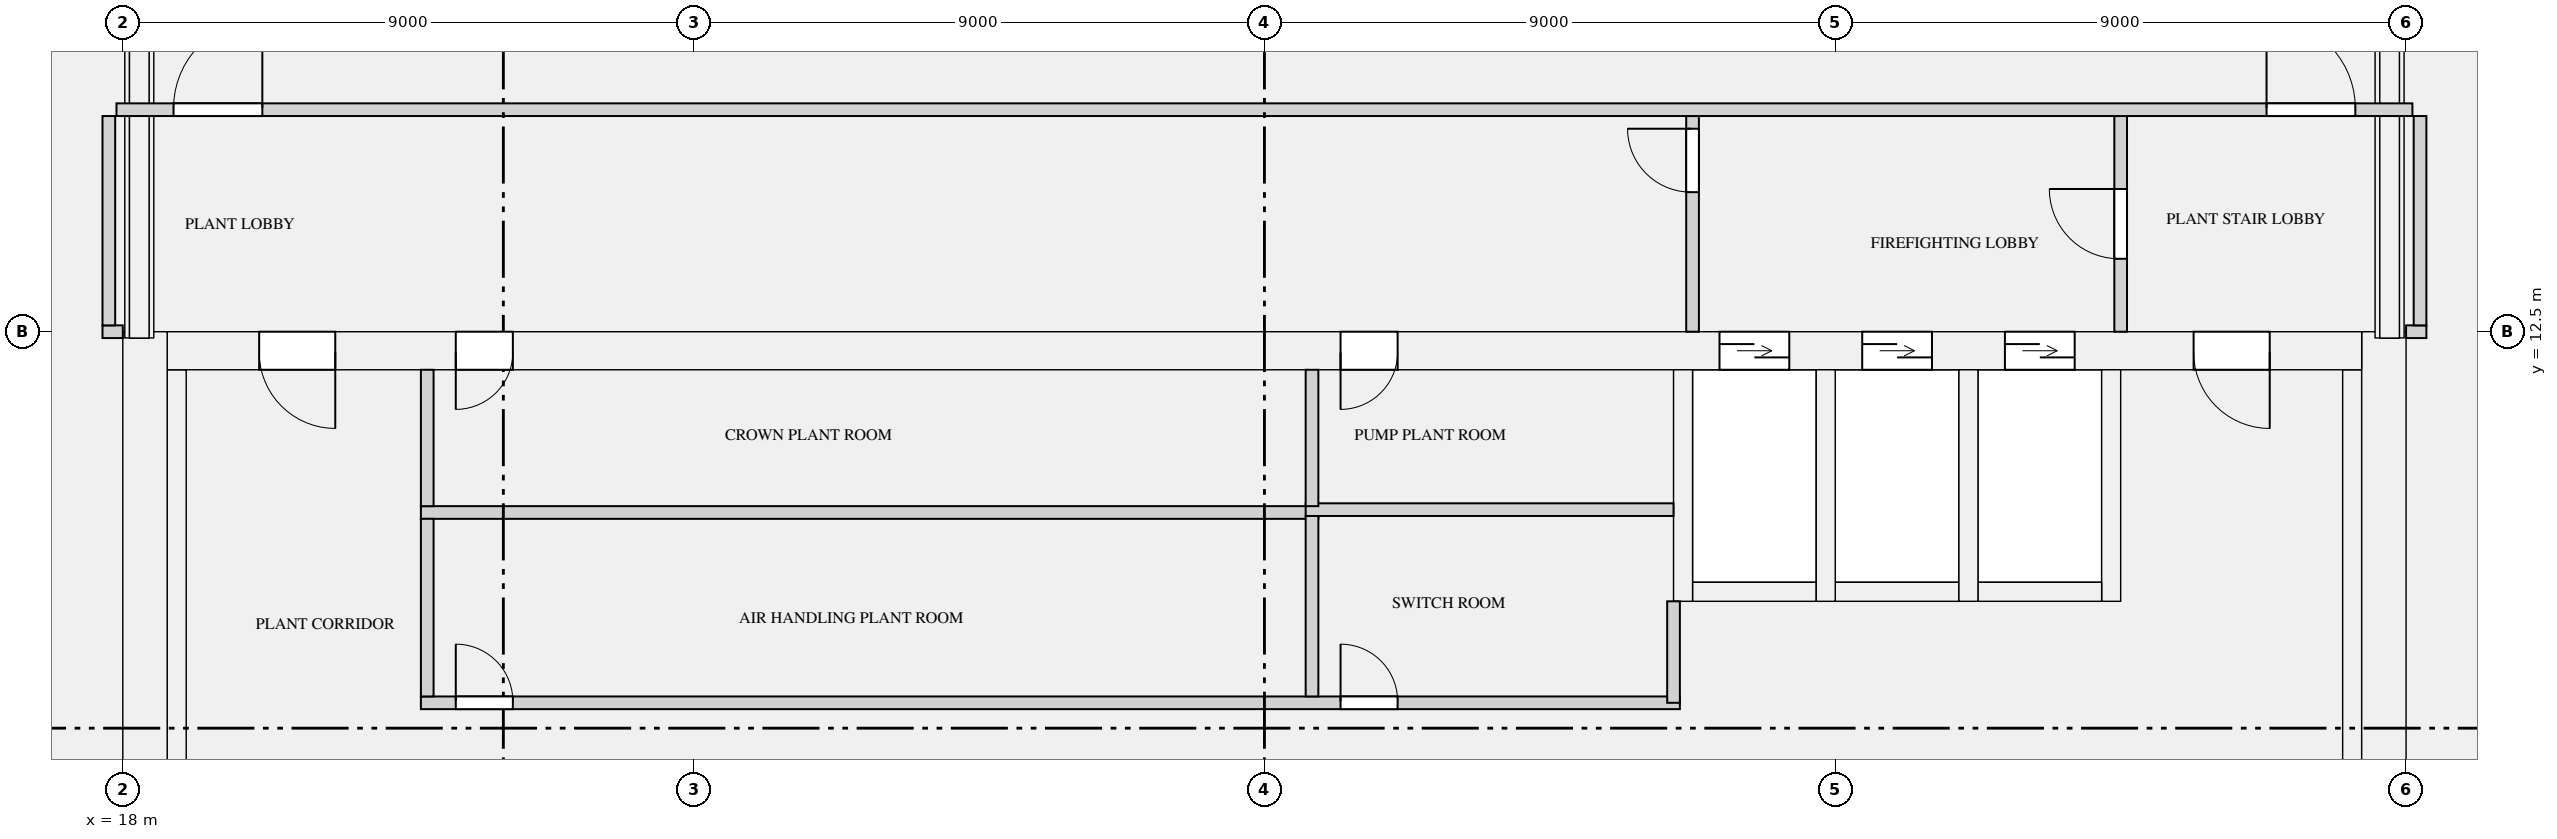
"""IFC4 building model, lengths in metres.
Left out: names, types, materials, properties, quantities, classifications, styles, units other than length and angle.
Written with IfcOpenShell. Run it as: python <this file> out.ifc"""

import sys

from ifc_helpers import new_model, si_unit, direction, frame, frame_2d, origin, place, context, subcontext, project, spatial, rectangle, extrude, element, fill, save


model = new_model("IFC4")
c1 = context("Model", 3, precision=1e-05, world=origin(), true_north=direction((0.0, 1.0)))
c2 = subcontext(c1, "Body", "Model", "MODEL_VIEW")
j1 = project(units=[si_unit("LENGTHUNIT", "METRE"), si_unit("PLANEANGLEUNIT", "RADIAN")], contexts=[c1])
p1 = place(None, origin())
s1 = spatial("IfcSite", under=j1, at=p1, CompositionType="ELEMENT")
p2 = place(p1, origin())
s2 = spatial("IfcBuilding", under=s1, at=p2, CompositionType="ELEMENT")
p3 = place(p2, frame((0.0, 0.0, 185.4)))
s3 = spatial("IfcBuildingStorey", under=s2, at=p3, CompositionType="ELEMENT", Elevation=185.4)
for number, where, z_axis, x_axis in (
    (1, (18.35, 0.0, 0.0), (0.0, 0.0, 1.0), (0.0, 1.0, 0.0)),
    (2, (53.65, 0.0, 0.0), (0.0, 0.0, 1.0), (0.0, 1.0, 0.0)),
):
    element("IfcWall", number, at=place(p3, frame(where, z_axis=z_axis, x_axis=x_axis)), inside=s3, PredefinedType="SHEAR", context=c2, shape_type="SweptSolid", body=[
        extrude(rectangle(XDim=12.5, YDim=0.7, at=frame_2d((6.25, 0.0))), origin(), (0.0, 0.0, 1.0), 6.3),
    ])
p4 = place(p3, frame((18.7, 12.2, 0.0), z_axis=(0.0, 0.0, 1.0), x_axis=(1.0, 0.0, 0.0)))
e3 = element("IfcWall", 3, at=p4, inside=s3, PredefinedType="SHEAR", context=c2, shape_type="SweptSolid", body=[
    extrude(rectangle(XDim=34.6, YDim=0.6, at=frame_2d((17.3, 0.0))), origin(), (0.0, 0.0, 1.0), 6.3),
])
p5 = place(p4, frame((24.475, 0.0, 0.0)))
e4 = element("IfcOpeningElement", 4, at=p5, cuts=e3, PredefinedType="OPENING", context=c2, shape_type="SweptSolid", body=[
    extrude(rectangle(XDim=1.1, YDim=2.1, at=frame_2d((0.55, 1.05))), frame((0.0, 0.31, 0.0), z_axis=(0.0, -1.0, 0.0), x_axis=(1.0, 0.0, 0.0)), (0.0, 0.0, 1.0), 0.62),
])
p6 = place(p4, frame((26.725, 0.0, 0.0)))
e5 = element("IfcOpeningElement", 5, at=p6, cuts=e3, PredefinedType="OPENING", context=c2, shape_type="SweptSolid", body=[
    extrude(rectangle(XDim=1.1, YDim=2.1, at=frame_2d((0.55, 1.05))), frame((0.0, 0.31, 0.0), z_axis=(0.0, -1.0, 0.0), x_axis=(1.0, 0.0, 0.0)), (0.0, 0.0, 1.0), 0.62),
])
p7 = place(p4, frame((28.975, 0.0, 0.0)))
e6 = element("IfcOpeningElement", 6, at=p7, cuts=e3, PredefinedType="OPENING", context=c2, shape_type="SweptSolid", body=[
    extrude(rectangle(XDim=1.1, YDim=2.1, at=frame_2d((0.55, 1.05))), frame((0.0, 0.31, 0.0), z_axis=(0.0, -1.0, 0.0), x_axis=(1.0, 0.0, 0.0)), (0.0, 0.0, 1.0), 0.62),
])
p8 = place(p4, frame((18.5, 0.0, 0.0)))
e7 = element("IfcOpeningElement", 7, at=p8, cuts=e3, PredefinedType="OPENING", context=c2, shape_type="SweptSolid", body=[
    extrude(rectangle(XDim=0.9, YDim=2.1, at=frame_2d((0.45, 1.05))), frame((0.0, 0.31, 0.0), z_axis=(0.0, -1.0, 0.0), x_axis=(1.0, 0.0, 0.0)), (0.0, 0.0, 1.0), 0.62),
])
p9 = place(p4, frame((4.55, 0.0, 0.0)))
e8 = element("IfcOpeningElement", 8, at=p9, cuts=e3, PredefinedType="OPENING", context=c2, shape_type="SweptSolid", body=[
    extrude(rectangle(XDim=0.9, YDim=2.1, at=frame_2d((0.45, 1.05))), frame((0.0, 0.31, 0.0), z_axis=(0.0, -1.0, 0.0), x_axis=(1.0, 0.0, 0.0)), (0.0, 0.0, 1.0), 0.62),
])
p10 = place(p4, frame((1.45, 0.0, 0.0)))
e9 = element("IfcOpeningElement", 9, at=p10, cuts=e3, PredefinedType="OPENING", context=c2, shape_type="SweptSolid", body=[
    extrude(rectangle(XDim=1.2, YDim=2.1, at=frame_2d((0.6, 1.05))), frame((0.0, 0.31, 0.0), z_axis=(0.0, -1.0, 0.0), x_axis=(1.0, 0.0, 0.0)), (0.0, 0.0, 1.0), 0.62),
])
p11 = place(p4, frame((31.95, 0.0, 0.0)))
e10 = element("IfcOpeningElement", 10, at=p11, cuts=e3, PredefinedType="OPENING", context=c2, shape_type="SweptSolid", body=[
    extrude(rectangle(XDim=1.2, YDim=2.1, at=frame_2d((0.6, 1.05))), frame((0.0, 0.31, 0.0), z_axis=(0.0, -1.0, 0.0), x_axis=(1.0, 0.0, 0.0)), (0.0, 0.0, 1.0), 0.62),
])
for number, where, z_axis, x_axis in (
    (11, (18.85, 1.0, 0.0), (0.0, 0.0, 1.0), (0.0, 1.0, 0.0)),
    (12, (53.15, 1.0, 0.0), (0.0, 0.0, 1.0), (0.0, 1.0, 0.0)),
):
    element("IfcWall", number, at=place(p3, frame(where, z_axis=z_axis, x_axis=x_axis)), inside=s3, PredefinedType="SHEAR", context=c2, shape_type="SweptSolid", body=[
        extrude(rectangle(XDim=10.9, YDim=0.3, at=frame_2d((5.45, 0.0))), origin(), (0.0, 0.0, 1.0), 6.3),
    ])
p12 = place(p3, frame((42.75, 8.4, 0.0), z_axis=(0.0, 0.0, 1.0), x_axis=(1.0, 0.0, 0.0)))
e13 = element("IfcWall", 13, at=p12, inside=s3, PredefinedType="SHEAR", context=c2, shape_type="SweptSolid", body=[
    extrude(rectangle(XDim=1.95, YDim=0.3, at=frame_2d((0.975, 0.0))), origin(), (0.0, 0.0, 1.0), 6.3),
])
p13 = place(p3, frame((42.6, 8.25, 0.0), z_axis=(0.0, 0.0, 1.0), x_axis=(0.0, 1.0, 0.0)))
e14 = element("IfcWall", 14, at=p13, inside=s3, PredefinedType="SHEAR", context=c2, shape_type="SweptSolid", body=[
    extrude(rectangle(XDim=3.65, YDim=0.3, at=frame_2d((1.825, 0.0))), origin(), (0.0, 0.0, 1.0), 6.3),
])
p14 = place(p3, frame((45.0, 8.4, 0.0), z_axis=(0.0, 0.0, 1.0), x_axis=(1.0, 0.0, 0.0)))
e15 = element("IfcWall", 15, at=p14, inside=s3, PredefinedType="SHEAR", context=c2, shape_type="SweptSolid", body=[
    extrude(rectangle(XDim=1.95, YDim=0.3, at=frame_2d((0.975, 0.0))), origin(), (0.0, 0.0, 1.0), 6.3),
])
p15 = place(p3, frame((44.85, 8.25, 0.0), z_axis=(0.0, 0.0, 1.0), x_axis=(0.0, 1.0, 0.0)))
e16 = element("IfcWall", 16, at=p15, inside=s3, PredefinedType="SHEAR", context=c2, shape_type="SweptSolid", body=[
    extrude(rectangle(XDim=3.65, YDim=0.3, at=frame_2d((1.825, 0.0))), origin(), (0.0, 0.0, 1.0), 6.3),
])
p16 = place(p3, frame((47.25, 8.4, 0.0), z_axis=(0.0, 0.0, 1.0), x_axis=(1.0, 0.0, 0.0)))
e17 = element("IfcWall", 17, at=p16, inside=s3, PredefinedType="SHEAR", context=c2, shape_type="SweptSolid", body=[
    extrude(rectangle(XDim=1.95, YDim=0.3, at=frame_2d((0.975, 0.0))), origin(), (0.0, 0.0, 1.0), 6.3),
])
for number, where, z_axis, x_axis in (
    (18, (47.1, 8.25, 0.0), (0.0, 0.0, 1.0), (0.0, 1.0, 0.0)),
    (19, (49.35, 8.25, 0.0), (0.0, 0.0, 1.0), (0.0, 1.0, 0.0)),
):
    element("IfcWall", number, at=place(p3, frame(where, z_axis=z_axis, x_axis=x_axis)), inside=s3, PredefinedType="SHEAR", context=c2, shape_type="SweptSolid", body=[
        extrude(rectangle(XDim=3.65, YDim=0.3, at=frame_2d((1.825, 0.0))), origin(), (0.0, 0.0, 1.0), 6.3),
    ])
p17 = place(p3, frame((22.7, 6.65, 0.0), z_axis=(0.0, 0.0, 1.0), x_axis=(1.0, 0.0, 0.0)))
e20 = element("IfcWall", 20, at=p17, inside=s3, PredefinedType="PARTITIONING", context=c2, shape_type="SweptSolid", body=[
    extrude(rectangle(XDim=19.85, YDim=0.2, at=frame_2d((9.925, 0.0))), origin(), (0.0, 0.0, 1.0), 5.8),
])
p18 = place(p17, frame((14.5, 0.0, 0.0)))
e21 = element("IfcOpeningElement", 21, at=p18, cuts=e20, PredefinedType="OPENING", context=c2, shape_type="SweptSolid", body=[
    extrude(rectangle(XDim=0.9, YDim=2.1, at=frame_2d((0.45, 1.05))), frame((0.0, 0.11, 0.0), z_axis=(0.0, -1.0, 0.0), x_axis=(1.0, 0.0, 0.0)), (0.0, 0.0, 1.0), 0.22),
])
p19 = place(p17, frame((0.55, 0.0, 0.0)))
e22 = element("IfcOpeningElement", 22, at=p19, cuts=e20, PredefinedType="OPENING", context=c2, shape_type="SweptSolid", body=[
    extrude(rectangle(XDim=0.9, YDim=2.1, at=frame_2d((0.45, 1.05))), frame((0.0, 0.11, 0.0), z_axis=(0.0, -1.0, 0.0), x_axis=(1.0, 0.0, 0.0)), (0.0, 0.0, 1.0), 0.22),
])
p20 = place(p3, frame((22.7, 9.65, 0.0), z_axis=(0.0, 0.0, 1.0), x_axis=(1.0, 0.0, 0.0)))
e23 = element("IfcWall", 23, at=p20, inside=s3, PredefinedType="PARTITIONING", context=c2, shape_type="SweptSolid", body=[
    extrude(rectangle(XDim=14.15, YDim=0.2, at=frame_2d((7.075, 0.0))), origin(), (0.0, 0.0, 1.0), 5.8),
])
p21 = place(p3, frame((36.65, 9.695, 0.0), z_axis=(0.0, 0.0, 1.0), x_axis=(1.0, 0.0, 0.0)))
e24 = element("IfcWall", 24, at=p21, inside=s3, PredefinedType="PARTITIONING", context=c2, shape_type="SweptSolid", body=[
    extrude(rectangle(XDim=5.8, YDim=0.2, at=frame_2d((2.9, 0.0))), origin(), (0.0, 0.0, 1.0), 5.8),
])
for number, where, z_axis, x_axis in (
    (25, (17.68, 12.5, 0.0), (0.0, 0.0, 1.0), (1.0, 0.0, 0.0)),
    (26, (54.0, 12.5, 0.0), (0.0, 0.0, 1.0), (1.0, 0.0, 0.0)),
):
    element("IfcWall", number, at=place(p3, frame(where, z_axis=z_axis, x_axis=x_axis)), inside=s3, PredefinedType="PARTITIONING", context=c2, shape_type="SweptSolid", body=[
        extrude(rectangle(XDim=0.32, YDim=0.2, at=frame_2d((0.16, 0.0))), origin(), (0.0, 0.0, 1.0), 5.8),
    ])
p22 = place(p3, frame((42.45, 6.65, 0.0), z_axis=(0.0, 0.0, 1.0), x_axis=(0.0, 1.0, 0.0)))
e27 = element("IfcWall", 27, at=p22, inside=s3, PredefinedType="PARTITIONING", context=c2, shape_type="SweptSolid", body=[
    extrude(rectangle(XDim=1.6, YDim=0.2, at=frame_2d((0.8, 0.0))), origin(), (0.0, 0.0, 1.0), 5.8),
])
p23 = place(p3, frame((22.8, 6.75, 0.0), z_axis=(0.0, 0.0, 1.0), x_axis=(0.0, 1.0, 0.0)))
e28 = element("IfcWall", 28, at=p23, inside=s3, PredefinedType="PARTITIONING", context=c2, shape_type="SweptSolid", body=[
    extrude(rectangle(XDim=2.8, YDim=0.2, at=frame_2d((1.4, 0.0))), origin(), (0.0, 0.0, 1.0), 5.8),
])
p24 = place(p3, frame((36.75, 6.75, 0.0), z_axis=(0.0, 0.0, 1.0), x_axis=(0.0, 1.0, 0.0)))
e29 = element("IfcWall", 29, at=p24, inside=s3, PredefinedType="PARTITIONING", context=c2, shape_type="SweptSolid", body=[
    extrude(rectangle(XDim=2.845, YDim=0.2, at=frame_2d((1.422, 0.0))), origin(), (0.0, 0.0, 1.0), 5.8),
])
for number, where, z_axis, x_axis in (
    (30, (22.8, 9.75, 0.0), (0.0, 0.0, 1.0), (0.0, 1.0, 0.0)),
    (31, (36.75, 9.75, 0.0), (0.0, 0.0, 1.0), (0.0, 1.0, 0.0)),
):
    element("IfcWall", number, at=place(p3, frame(where, z_axis=z_axis, x_axis=x_axis)), inside=s3, PredefinedType="PARTITIONING", context=c2, shape_type="SweptSolid", body=[
        extrude(rectangle(XDim=2.15, YDim=0.2, at=frame_2d((1.075, 0.0))), origin(), (0.0, 0.0, 1.0), 5.8),
    ])
p25 = place(p3, frame((42.75, 12.5, 0.0), z_axis=(0.0, 0.0, 1.0), x_axis=(0.0, 1.0, 0.0)))
e32 = element("IfcWall", 32, at=p25, inside=s3, PredefinedType="PARTITIONING", context=c2, shape_type="SweptSolid", body=[
    extrude(rectangle(XDim=3.4, YDim=0.2, at=frame_2d((1.7, 0.0))), origin(), (0.0, 0.0, 1.0), 5.8),
])
p26 = place(p25, frame((2.2, 0.0, 0.0)))
e33 = element("IfcOpeningElement", 33, at=p26, cuts=e32, PredefinedType="OPENING", context=c2, shape_type="SweptSolid", body=[
    extrude(rectangle(XDim=1.0, YDim=2.1, at=frame_2d((0.5, 1.05))), frame((0.0, 0.11, 0.0), z_axis=(0.0, -1.0, 0.0), x_axis=(1.0, 0.0, 0.0)), (0.0, 0.0, 1.0), 0.22),
])
p27 = place(p3, frame((49.5, 12.5, 0.0), z_axis=(0.0, 0.0, 1.0), x_axis=(0.0, 1.0, 0.0)))
e34 = element("IfcWall", 34, at=p27, inside=s3, PredefinedType="PARTITIONING", context=c2, shape_type="SweptSolid", body=[
    extrude(rectangle(XDim=3.4, YDim=0.2, at=frame_2d((1.7, 0.0))), origin(), (0.0, 0.0, 1.0), 5.8),
])
p28 = place(p27, frame((1.15, 0.0, 0.0)))
e35 = element("IfcOpeningElement", 35, at=p28, cuts=e34, PredefinedType="OPENING", context=c2, shape_type="SweptSolid", body=[
    extrude(rectangle(XDim=1.1, YDim=2.1, at=frame_2d((0.55, 1.05))), frame((0.0, 0.11, 0.0), z_axis=(0.0, -1.0, 0.0), x_axis=(1.0, 0.0, 0.0)), (0.0, 0.0, 1.0), 0.22),
])
for number, where, z_axis, x_axis in (
    (36, (17.78, 12.6, 0.0), (0.0, 0.0, 1.0), (0.0, 1.0, 0.0)),
    (37, (54.22, 12.6, 0.0), (0.0, 0.0, 1.0), (0.0, 1.0, 0.0)),
):
    element("IfcWall", number, at=place(p3, frame(where, z_axis=z_axis, x_axis=x_axis)), inside=s3, PredefinedType="PARTITIONING", context=c2, shape_type="SweptSolid", body=[
        extrude(rectangle(XDim=3.3, YDim=0.2, at=frame_2d((1.65, 0.0))), origin(), (0.0, 0.0, 1.0), 5.8),
    ])
p29 = place(p3, frame((17.9, 16.0, 0.0), z_axis=(0.0, 0.0, 1.0), x_axis=(1.0, 0.0, 0.0)))
e38 = element("IfcWall", 38, at=p29, inside=s3, PredefinedType="PARTITIONING", context=c2, shape_type="SweptSolid", body=[
    extrude(rectangle(XDim=36.2, YDim=0.2, at=frame_2d((18.1, 0.0))), origin(), (0.0, 0.0, 1.0), 5.8),
])
p30 = place(p29, frame((0.9, 0.0, 0.0)))
e39 = element("IfcOpeningElement", 39, at=p30, cuts=e38, PredefinedType="OPENING", context=c2, shape_type="SweptSolid", body=[
    extrude(rectangle(XDim=1.4, YDim=2.1, at=frame_2d((0.7, 1.05))), frame((0.0, 0.11, 0.0), z_axis=(0.0, -1.0, 0.0), x_axis=(1.0, 0.0, 0.0)), (0.0, 0.0, 1.0), 0.22),
])
p31 = place(p29, frame((33.9, 0.0, 0.0)))
e40 = element("IfcOpeningElement", 40, at=p31, cuts=e38, PredefinedType="OPENING", context=c2, shape_type="SweptSolid", body=[
    extrude(rectangle(XDim=1.4, YDim=2.1, at=frame_2d((0.7, 1.05))), frame((0.0, 0.11, 0.0), z_axis=(0.0, -1.0, 0.0), x_axis=(1.0, 0.0, 0.0)), (0.0, 0.0, 1.0), 0.22),
])
p32 = place(p5, origin())
e41 = element("IfcDoor", 41, at=p32, inside=s3, OperationType="DOUBLE_DOOR_SLIDING", PredefinedType="DOOR", context=c2, shape_type="SweptSolid", body=[
    extrude(rectangle(XDim=1.1, YDim=2.1, at=frame_2d((0.55, 1.05))), frame((0.0, 0.025, 0.0), z_axis=(0.0, -1.0, 0.0), x_axis=(1.0, 0.0, 0.0)), (0.0, 0.0, 1.0), 0.05),
])
fill(e4, e41)
p33 = place(p6, origin())
e42 = element("IfcDoor", 42, at=p33, inside=s3, OperationType="DOUBLE_DOOR_SLIDING", PredefinedType="DOOR", context=c2, shape_type="SweptSolid", body=[
    extrude(rectangle(XDim=1.1, YDim=2.1, at=frame_2d((0.55, 1.05))), frame((0.0, 0.025, 0.0), z_axis=(0.0, -1.0, 0.0), x_axis=(1.0, 0.0, 0.0)), (0.0, 0.0, 1.0), 0.05),
])
fill(e5, e42)
p34 = place(p7, origin())
e43 = element("IfcDoor", 43, at=p34, inside=s3, OperationType="DOUBLE_DOOR_SLIDING", PredefinedType="DOOR", context=c2, shape_type="SweptSolid", body=[
    extrude(rectangle(XDim=1.1, YDim=2.1, at=frame_2d((0.55, 1.05))), frame((0.0, 0.025, 0.0), z_axis=(0.0, -1.0, 0.0), x_axis=(1.0, 0.0, 0.0)), (0.0, 0.0, 1.0), 0.05),
])
fill(e6, e43)
p35 = place(p18, origin())
e44 = element("IfcDoor", 44, at=p35, inside=s3, OperationType="SINGLE_SWING_LEFT", PredefinedType="DOOR", context=c2, shape_type="SweptSolid", body=[
    extrude(rectangle(XDim=0.9, YDim=2.1, at=frame_2d((0.45, 1.05))), frame((0.0, 0.025, 0.0), z_axis=(0.0, -1.0, 0.0), x_axis=(1.0, 0.0, 0.0)), (0.0, 0.0, 1.0), 0.05),
])
fill(e21, e44)
p36 = place(p8, frame((0.9, 0.0, 0.0), z_axis=(0.0, 0.0, 1.0), x_axis=(-1.0, 0.0, 0.0)))
e45 = element("IfcDoor", 45, at=p36, inside=s3, OperationType="SINGLE_SWING_RIGHT", PredefinedType="DOOR", context=c2, shape_type="SweptSolid", body=[
    extrude(rectangle(XDim=0.9, YDim=2.1, at=frame_2d((0.45, 1.05))), frame((0.0, 0.025, 0.0), z_axis=(0.0, -1.0, 0.0), x_axis=(1.0, 0.0, 0.0)), (0.0, 0.0, 1.0), 0.05),
])
fill(e7, e45)
p37 = place(p9, frame((0.9, 0.0, 0.0), z_axis=(0.0, 0.0, 1.0), x_axis=(-1.0, 0.0, 0.0)))
e46 = element("IfcDoor", 46, at=p37, inside=s3, OperationType="SINGLE_SWING_RIGHT", PredefinedType="DOOR", context=c2, shape_type="SweptSolid", body=[
    extrude(rectangle(XDim=0.9, YDim=2.1, at=frame_2d((0.45, 1.05))), frame((0.0, 0.025, 0.0), z_axis=(0.0, -1.0, 0.0), x_axis=(1.0, 0.0, 0.0)), (0.0, 0.0, 1.0), 0.05),
])
fill(e8, e46)
p38 = place(p19, origin())
e47 = element("IfcDoor", 47, at=p38, inside=s3, OperationType="SINGLE_SWING_LEFT", PredefinedType="DOOR", context=c2, shape_type="SweptSolid", body=[
    extrude(rectangle(XDim=0.9, YDim=2.1, at=frame_2d((0.45, 1.05))), frame((0.0, 0.025, 0.0), z_axis=(0.0, -1.0, 0.0), x_axis=(1.0, 0.0, 0.0)), (0.0, 0.0, 1.0), 0.05),
])
fill(e22, e47)
p39 = place(p10, frame((1.2, 0.0, 0.0), z_axis=(0.0, 0.0, 1.0), x_axis=(-1.0, 0.0, 0.0)))
e48 = element("IfcDoor", 48, at=p39, inside=s3, OperationType="SINGLE_SWING_LEFT", PredefinedType="DOOR", context=c2, shape_type="SweptSolid", body=[
    extrude(rectangle(XDim=1.2, YDim=2.1, at=frame_2d((0.6, 1.05))), frame((0.0, 0.025, 0.0), z_axis=(0.0, -1.0, 0.0), x_axis=(1.0, 0.0, 0.0)), (0.0, 0.0, 1.0), 0.05),
])
fill(e9, e48)
p40 = place(p11, frame((1.2, 0.0, 0.0), z_axis=(0.0, 0.0, 1.0), x_axis=(-1.0, 0.0, 0.0)))
e49 = element("IfcDoor", 49, at=p40, inside=s3, OperationType="SINGLE_SWING_LEFT", PredefinedType="DOOR", context=c2, shape_type="SweptSolid", body=[
    extrude(rectangle(XDim=1.2, YDim=2.1, at=frame_2d((0.6, 1.05))), frame((0.0, 0.025, 0.0), z_axis=(0.0, -1.0, 0.0), x_axis=(1.0, 0.0, 0.0)), (0.0, 0.0, 1.0), 0.05),
])
fill(e10, e49)
p41 = place(p26, origin())
e50 = element("IfcDoor", 50, at=p41, inside=s3, OperationType="SINGLE_SWING_RIGHT", PredefinedType="DOOR", context=c2, shape_type="SweptSolid", body=[
    extrude(rectangle(XDim=1.0, YDim=2.1, at=frame_2d((0.5, 1.05))), frame((0.0, 0.025, 0.0), z_axis=(0.0, -1.0, 0.0), x_axis=(1.0, 0.0, 0.0)), (0.0, 0.0, 1.0), 0.05),
])
fill(e33, e50)
p42 = place(p28, origin())
e51 = element("IfcDoor", 51, at=p42, inside=s3, OperationType="SINGLE_SWING_RIGHT", PredefinedType="DOOR", context=c2, shape_type="SweptSolid", body=[
    extrude(rectangle(XDim=1.1, YDim=2.1, at=frame_2d((0.55, 1.05))), frame((0.0, 0.025, 0.0), z_axis=(0.0, -1.0, 0.0), x_axis=(1.0, 0.0, 0.0)), (0.0, 0.0, 1.0), 0.05),
])
fill(e35, e51)
p43 = place(p30, origin())
e52 = element("IfcDoor", 52, at=p43, inside=s3, OperationType="SINGLE_SWING_RIGHT", PredefinedType="DOOR", context=c2, shape_type="SweptSolid", body=[
    extrude(rectangle(XDim=1.4, YDim=2.1, at=frame_2d((0.7, 1.05))), frame((0.0, 0.025, 0.0), z_axis=(0.0, -1.0, 0.0), x_axis=(1.0, 0.0, 0.0)), (0.0, 0.0, 1.0), 0.05),
])
fill(e39, e52)
p44 = place(p31, origin())
e53 = element("IfcDoor", 53, at=p44, inside=s3, OperationType="SINGLE_SWING_LEFT", PredefinedType="DOOR", context=c2, shape_type="SweptSolid", body=[
    extrude(rectangle(XDim=1.4, YDim=2.1, at=frame_2d((0.7, 1.05))), frame((0.0, 0.025, 0.0), z_axis=(0.0, -1.0, 0.0), x_axis=(1.0, 0.0, 0.0)), (0.0, 0.0, 1.0), 0.05),
])
fill(e40, e53)
save(model, sys.argv[1])
